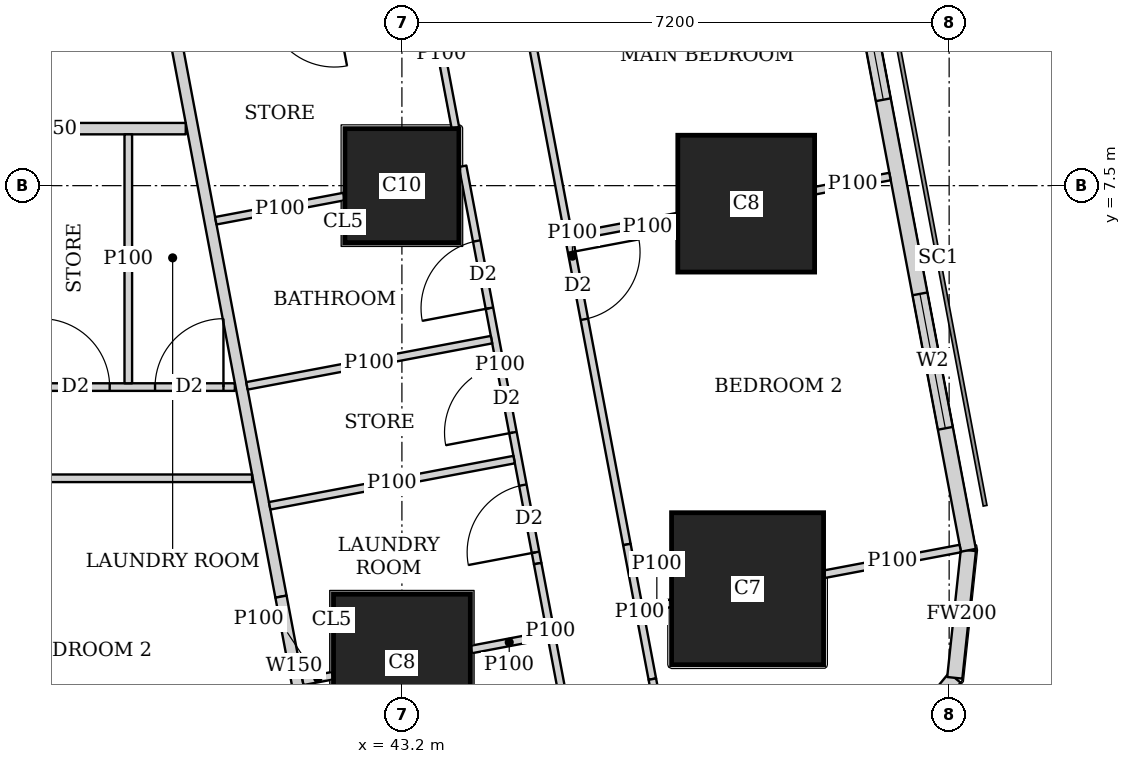
"""IFC4 building model, lengths in metres.
Left out: names, types, materials, properties, quantities, classifications, styles, units other than length and angle.
Written with IfcOpenShell. Run it as: python <this file> out.ifc"""

import sys

from ifc_helpers import new_model, si_unit, direction, frame, frame_2d, origin, origin_2d, place, context, subcontext, project, spatial, rectangle, extrude, element, fill, save


model = new_model("IFC4")
c1 = context("Model", 3, precision=1e-05, world=origin(), true_north=direction((0.0, 1.0)))
c2 = subcontext(c1, "Body", "Model", "MODEL_VIEW")
j1 = project(units=[si_unit("LENGTHUNIT", "METRE"), si_unit("PLANEANGLEUNIT", "RADIAN")], contexts=[c1])
p1 = place(None, origin())
s1 = spatial("IfcSite", under=j1, at=p1, CompositionType="ELEMENT")
p2 = place(p1, origin())
s2 = spatial("IfcBuilding", under=s1, at=p2, CompositionType="ELEMENT")
p3 = place(p2, frame((0.0, 0.0, 169.55)))
s3 = spatial("IfcBuildingStorey", under=s2, at=p3, CompositionType="ELEMENT", Elevation=169.55)
p4 = place(p3, frame((43.2, 1.225, 0.0), z_axis=(0.0, 0.0, 1.0), x_axis=(1.0, 0.0, 0.0)))
e1 = element("IfcColumn", 1, at=p4, inside=s3, PredefinedType="COLUMN", context=c2, shape_type="SweptSolid", body=[
    extrude(rectangle(XDim=1.8, YDim=1.8, at=origin_2d()), origin(), (0.0, 0.0, 1.0), 3.75),
])
p5 = place(p3, frame((47.748, 2.197, 0.0), z_axis=(0.0, 0.0, 1.0), x_axis=(1.0, 0.0, 0.0)))
e2 = element("IfcColumn", 2, at=p5, inside=s3, PredefinedType="COLUMN", context=c2, shape_type="SweptSolid", body=[
    extrude(rectangle(XDim=2.0, YDim=2.0, at=origin_2d()), origin(), (0.0, 0.0, 1.0), 3.75),
])
p6 = place(p3, frame((43.2, 7.5, 0.0), z_axis=(0.0, 0.0, 1.0), x_axis=(1.0, 0.0, 0.0)))
e3 = element("IfcColumn", 3, at=p6, inside=s3, PredefinedType="COLUMN", context=c2, shape_type="SweptSolid", body=[
    extrude(rectangle(XDim=1.5, YDim=1.5, at=origin_2d()), origin(), (0.0, 0.0, 1.0), 3.75),
])
p7 = place(p3, frame((47.73, 7.263, 0.0), z_axis=(0.0, 0.0, 1.0), x_axis=(1.0, 0.0, 0.0)))
e4 = element("IfcColumn", 4, at=p7, inside=s3, PredefinedType="COLUMN", context=c2, shape_type="SweptSolid", body=[
    extrude(rectangle(XDim=1.8, YDim=1.8, at=origin_2d()), origin(), (0.0, 0.0, 1.0), 3.75),
])
p8 = place(p3, frame((49.407, -0.263, 0.0), z_axis=(0.0, 0.0, 1.0), x_axis=(0.638042593423, 0.770001070764, 0.0)))
e5 = element("IfcWall", 5, at=p8, inside=s3, PredefinedType="SOLIDWALL", context=c2, shape_type="SweptSolid", body=[
    extrude(rectangle(XDim=1.673, YDim=0.2, at=frame_2d((0.836, 0.0))), origin(), (0.0, 0.0, 1.0), 3.5),
])
p9 = place(p3, frame((50.474, 1.025, 0.0), z_axis=(0.0, 0.0, 1.0), x_axis=(0.106047815515, 0.994361031429, 0.0)))
e6 = element("IfcWall", 6, at=p9, inside=s3, PredefinedType="SOLIDWALL", context=c2, shape_type="SweptSolid", body=[
    extrude(rectangle(XDim=1.688, YDim=0.2, at=frame_2d((0.844, 0.0))), origin(), (0.0, 0.0, 1.0), 3.5),
])
p10 = place(p3, frame((50.653, 2.703, 0.0), z_axis=(0.0, 0.0, 1.0), x_axis=(-0.185612026696, 0.982623109613, 0.0)))
e7 = element("IfcWall", 7, at=p10, inside=s3, PredefinedType="SOLIDWALL", context=c2, shape_type="SweptSolid", body=[
    extrude(rectangle(XDim=41.393, YDim=0.2, at=frame_2d((20.697, 0.0))), origin(), (0.0, 0.0, 1.0), 3.5),
])
p11 = place(p10, frame((1.633, 0.0, 0.9)))
e8 = element("IfcOpeningElement", 8, at=p11, cuts=e7, PredefinedType="OPENING", context=c2, shape_type="SweptSolid", body=[
    extrude(rectangle(XDim=1.8, YDim=1.5, at=frame_2d((0.9, 0.75))), frame((0.0, 0.11, 0.0), z_axis=(0.0, -1.0, 0.0), x_axis=(1.0, 0.0, 0.0)), (0.0, 0.0, 1.0), 0.22),
])
p12 = place(p10, frame((6.032, 0.0, 0.9)))
e9 = element("IfcOpeningElement", 9, at=p12, cuts=e7, PredefinedType="OPENING", context=c2, shape_type="SweptSolid", body=[
    extrude(rectangle(XDim=1.8, YDim=1.5, at=frame_2d((0.9, 0.75))), frame((0.0, 0.11, 0.0), z_axis=(0.0, -1.0, 0.0), x_axis=(1.0, 0.0, 0.0)), (0.0, 0.0, 1.0), 0.22),
])
p13 = place(p10, frame((9.848, 0.0, 0.9)))
e10 = element("IfcOpeningElement", 10, at=p13, cuts=e7, PredefinedType="OPENING", context=c2, shape_type="SweptSolid", body=[
    extrude(rectangle(XDim=1.8, YDim=1.5, at=frame_2d((0.9, 0.75))), frame((0.0, 0.11, 0.0), z_axis=(0.0, -1.0, 0.0), x_axis=(1.0, 0.0, 0.0)), (0.0, 0.0, 1.0), 0.22),
])
p14 = place(p10, frame((13.664, 0.0, 0.9)))
e11 = element("IfcOpeningElement", 11, at=p14, cuts=e7, PredefinedType="OPENING", context=c2, shape_type="SweptSolid", body=[
    extrude(rectangle(XDim=1.8, YDim=1.5, at=frame_2d((0.9, 0.75))), frame((0.0, 0.11, 0.0), z_axis=(0.0, -1.0, 0.0), x_axis=(1.0, 0.0, 0.0)), (0.0, 0.0, 1.0), 0.22),
])
p15 = place(p10, frame((17.481, 0.0, 0.9)))
e12 = element("IfcOpeningElement", 12, at=p15, cuts=e7, PredefinedType="OPENING", context=c2, shape_type="SweptSolid", body=[
    extrude(rectangle(XDim=1.8, YDim=1.5, at=frame_2d((0.9, 0.75))), frame((0.0, 0.11, 0.0), z_axis=(0.0, -1.0, 0.0), x_axis=(1.0, 0.0, 0.0)), (0.0, 0.0, 1.0), 0.22),
])
p16 = place(p10, frame((21.297, 0.0, 0.9)))
e13 = element("IfcOpeningElement", 13, at=p16, cuts=e7, PredefinedType="OPENING", context=c2, shape_type="SweptSolid", body=[
    extrude(rectangle(XDim=1.8, YDim=1.5, at=frame_2d((0.9, 0.75))), frame((0.0, 0.11, 0.0), z_axis=(0.0, -1.0, 0.0), x_axis=(1.0, 0.0, 0.0)), (0.0, 0.0, 1.0), 0.22),
])
p17 = place(p10, frame((25.113, 0.0, 0.9)))
e14 = element("IfcOpeningElement", 14, at=p17, cuts=e7, PredefinedType="OPENING", context=c2, shape_type="SweptSolid", body=[
    extrude(rectangle(XDim=1.8, YDim=1.5, at=frame_2d((0.9, 0.75))), frame((0.0, 0.11, 0.0), z_axis=(0.0, -1.0, 0.0), x_axis=(1.0, 0.0, 0.0)), (0.0, 0.0, 1.0), 0.22),
])
p18 = place(p10, frame((28.93, 0.0, 0.9)))
e15 = element("IfcOpeningElement", 15, at=p18, cuts=e7, PredefinedType="OPENING", context=c2, shape_type="SweptSolid", body=[
    extrude(rectangle(XDim=1.8, YDim=1.5, at=frame_2d((0.9, 0.75))), frame((0.0, 0.11, 0.0), z_axis=(0.0, -1.0, 0.0), x_axis=(1.0, 0.0, 0.0)), (0.0, 0.0, 1.0), 0.22),
])
p19 = place(p10, frame((32.746, 0.0, 0.9)))
e16 = element("IfcOpeningElement", 16, at=p19, cuts=e7, PredefinedType="OPENING", context=c2, shape_type="SweptSolid", body=[
    extrude(rectangle(XDim=1.8, YDim=1.5, at=frame_2d((0.9, 0.75))), frame((0.0, 0.11, 0.0), z_axis=(0.0, -1.0, 0.0), x_axis=(1.0, 0.0, 0.0)), (0.0, 0.0, 1.0), 0.22),
])
p20 = place(p10, frame((36.481, 0.0, 0.9)))
e17 = element("IfcOpeningElement", 17, at=p20, cuts=e7, PredefinedType="OPENING", context=c2, shape_type="SweptSolid", body=[
    extrude(rectangle(XDim=1.8, YDim=1.5, at=frame_2d((0.9, 0.75))), frame((0.0, 0.11, 0.0), z_axis=(0.0, -1.0, 0.0), x_axis=(1.0, 0.0, 0.0)), (0.0, 0.0, 1.0), 0.22),
])
p21 = place(p3, frame((40.356, 8.25, 0.0), z_axis=(0.0, 0.0, 1.0), x_axis=(-1.0, 0.0, 0.0)))
e18 = element("IfcWall", 18, at=p21, inside=s3, PredefinedType="SOLIDWALL", context=c2, shape_type="SweptSolid", body=[
    extrude(rectangle(XDim=3.605, YDim=0.15, at=frame_2d((1.802, 0.0))), origin(), (0.0, 0.0, 1.0), 3.5),
])
p22 = place(p3, frame((33.877, 43.029, 0.0), z_axis=(0.0, 0.0, 1.0), x_axis=(0.185596841028, -0.98262597798, 0.0)))
e19 = element("IfcWall", 19, at=p22, inside=s3, PredefinedType="SOLIDWALL", context=c2, shape_type="SweptSolid", body=[
    extrude(rectangle(XDim=41.66, YDim=0.15, at=frame_2d((20.83, 0.0))), origin(), (0.0, 0.0, 1.0), 2.5),
])
p23 = place(p22, frame((8.63, 0.0, 0.0)))
e20 = element("IfcOpeningElement", 20, at=p23, cuts=e19, PredefinedType="OPENING", context=c2, shape_type="SweptSolid", body=[
    extrude(rectangle(XDim=1.0, YDim=2.1, at=frame_2d((0.5, 1.05))), frame((0.0, 0.085, 0.0), z_axis=(0.0, -1.0, 0.0), x_axis=(1.0, 0.0, 0.0)), (0.0, 0.0, 1.0), 0.17),
])
p24 = place(p22, frame((13.841, 0.0, 0.0)))
e21 = element("IfcOpeningElement", 21, at=p24, cuts=e19, PredefinedType="OPENING", context=c2, shape_type="SweptSolid", body=[
    extrude(rectangle(XDim=1.0, YDim=2.1, at=frame_2d((0.5, 1.05))), frame((0.0, 0.085, 0.0), z_axis=(0.0, -1.0, 0.0), x_axis=(1.0, 0.0, 0.0)), (0.0, 0.0, 1.0), 0.17),
])
p25 = place(p22, frame((21.474, 0.0, 0.0)))
e22 = element("IfcOpeningElement", 22, at=p25, cuts=e19, PredefinedType="OPENING", context=c2, shape_type="SweptSolid", body=[
    extrude(rectangle(XDim=1.0, YDim=2.1, at=frame_2d((0.5, 1.05))), frame((0.0, 0.085, 0.0), z_axis=(0.0, -1.0, 0.0), x_axis=(1.0, 0.0, 0.0)), (0.0, 0.0, 1.0), 0.17),
])
p26 = place(p22, frame((30.4, 0.0, 0.0)))
e23 = element("IfcOpeningElement", 23, at=p26, cuts=e19, PredefinedType="OPENING", context=c2, shape_type="SweptSolid", body=[
    extrude(rectangle(XDim=1.0, YDim=2.1, at=frame_2d((0.5, 1.05))), frame((0.0, 0.085, 0.0), z_axis=(0.0, -1.0, 0.0), x_axis=(1.0, 0.0, 0.0)), (0.0, 0.0, 1.0), 0.17),
])
p27 = place(p22, frame((32.288, 0.0, 0.0)))
e24 = element("IfcOpeningElement", 24, at=p27, cuts=e19, PredefinedType="OPENING", context=c2, shape_type="SweptSolid", body=[
    extrude(rectangle(XDim=1.0, YDim=2.1, at=frame_2d((0.5, 1.05))), frame((0.0, 0.085, 0.0), z_axis=(0.0, -1.0, 0.0), x_axis=(1.0, 0.0, 0.0)), (0.0, 0.0, 1.0), 0.17),
])
p28 = place(p3, frame((41.609, 2.093, 0.0), z_axis=(0.0, 0.0, 1.0), x_axis=(0.185708872674, -0.982604811005, 0.0)))
e25 = element("IfcWall", 25, at=p28, inside=s3, PredefinedType="SOLIDWALL", context=c2, shape_type="SweptSolid", body=[
    extrude(rectangle(XDim=1.847, YDim=0.15, at=frame_2d((0.924, 0.0))), origin(), (0.0, 0.0, 1.0), 2.1),
])
p29 = place(p3, frame((41.229, 3.65, 0.0), z_axis=(0.0, 0.0, 1.0), x_axis=(-1.0, 0.0, 0.0)))
e26 = element("IfcWall", 26, at=p29, inside=s3, PredefinedType="PARTITIONING", context=c2, shape_type="SweptSolid", body=[
    extrude(rectangle(XDim=8.829, YDim=0.1, at=frame_2d((4.415, 0.0))), origin(), (0.0, 0.0, 1.0), 3.5),
])
p30 = place(p29, frame((6.53, 0.0, 0.0)))
e27 = element("IfcOpeningElement", 27, at=p30, cuts=e26, PredefinedType="OPENING", context=c2, shape_type="SweptSolid", body=[
    extrude(rectangle(XDim=0.9, YDim=2.1, at=frame_2d((0.45, 1.05))), frame((0.0, 0.06, 0.0), z_axis=(0.0, -1.0, 0.0), x_axis=(1.0, 0.0, 0.0)), (0.0, 0.0, 1.0), 0.12),
])
p31 = place(p29, frame((4.129, 0.0, 0.0)))
e28 = element("IfcOpeningElement", 28, at=p31, cuts=e26, PredefinedType="OPENING", context=c2, shape_type="SweptSolid", body=[
    extrude(rectangle(XDim=0.9, YDim=2.1, at=frame_2d((0.45, 1.05))), frame((0.0, 0.06, 0.0), z_axis=(0.0, -1.0, 0.0), x_axis=(1.0, 0.0, 0.0)), (0.0, 0.0, 1.0), 0.12),
])
p32 = place(p3, frame((41.002, 4.85, 0.0), z_axis=(0.0, 0.0, 1.0), x_axis=(-1.0, 0.0, 0.0)))
e29 = element("IfcWall", 29, at=p32, inside=s3, PredefinedType="PARTITIONING", context=c2, shape_type="SweptSolid", body=[
    extrude(rectangle(XDim=7.403, YDim=0.1, at=frame_2d((3.701, 0.0))), origin(), (0.0, 0.0, 1.0), 3.5),
])
p33 = place(p32, frame((5.753, 0.0, 0.0)))
e30 = element("IfcOpeningElement", 30, at=p33, cuts=e29, PredefinedType="OPENING", context=c2, shape_type="SweptSolid", body=[
    extrude(rectangle(XDim=0.9, YDim=2.1, at=frame_2d((0.45, 1.05))), frame((0.0, 0.06, 0.0), z_axis=(0.0, -1.0, 0.0), x_axis=(1.0, 0.0, 0.0)), (0.0, 0.0, 1.0), 0.12),
])
p34 = place(p32, frame((3.447, 0.0, 0.0)))
e31 = element("IfcOpeningElement", 31, at=p34, cuts=e29, PredefinedType="OPENING", context=c2, shape_type="SweptSolid", body=[
    extrude(rectangle(XDim=0.9, YDim=2.1, at=frame_2d((0.45, 1.05))), frame((0.0, 0.06, 0.0), z_axis=(0.0, -1.0, 0.0), x_axis=(1.0, 0.0, 0.0)), (0.0, 0.0, 1.0), 0.12),
])
p35 = place(p32, frame((0.15, 0.0, 0.0)))
e32 = element("IfcOpeningElement", 32, at=p35, cuts=e29, PredefinedType="OPENING", context=c2, shape_type="SweptSolid", body=[
    extrude(rectangle(XDim=0.9, YDim=2.1, at=frame_2d((0.45, 1.05))), frame((0.0, 0.06, 0.0), z_axis=(0.0, -1.0, 0.0), x_axis=(1.0, 0.0, 0.0)), (0.0, 0.0, 1.0), 0.12),
])
p36 = place(p32, frame((1.647, 0.0, 0.0)))
e33 = element("IfcOpeningElement", 33, at=p36, cuts=e29, PredefinedType="OPENING", context=c2, shape_type="SweptSolid", body=[
    extrude(rectangle(XDim=0.9, YDim=2.1, at=frame_2d((0.45, 1.05))), frame((0.0, 0.06, 0.0), z_axis=(0.0, -1.0, 0.0), x_axis=(1.0, 0.0, 0.0)), (0.0, 0.0, 1.0), 0.12),
])
p37 = place(p3, frame((39.6, 4.9, 0.0), z_axis=(0.0, 0.0, 1.0), x_axis=(0.0, 1.0, 0.0)))
e34 = element("IfcWall", 34, at=p37, inside=s3, PredefinedType="PARTITIONING", context=c2, shape_type="SweptSolid", body=[
    extrude(rectangle(XDim=3.275, YDim=0.1, at=frame_2d((1.638, 0.0))), origin(), (0.0, 0.0, 1.0), 3.5),
])
p38 = place(p3, frame((44.727, 10.366, 0.0), z_axis=(0.0, 0.0, 1.0), x_axis=(0.185578957652, -0.982629355595, 0.0)))
e35 = element("IfcWall", 35, at=p38, inside=s3, PredefinedType="PARTITIONING", context=c2, shape_type="SweptSolid", body=[
    extrude(rectangle(XDim=7.721, YDim=0.1, at=frame_2d((3.86, 0.0))), origin(), (0.0, 0.0, 1.0), 3.5),
])
p39 = place(p38, frame((0.151, 0.0, 0.0)))
e36 = element("IfcOpeningElement", 36, at=p39, cuts=e35, PredefinedType="OPENING", context=c2, shape_type="SweptSolid", body=[
    extrude(rectangle(XDim=0.9, YDim=2.1, at=frame_2d((0.45, 1.05))), frame((0.0, 0.06, 0.0), z_axis=(0.0, -1.0, 0.0), x_axis=(1.0, 0.0, 0.0)), (0.0, 0.0, 1.0), 0.12),
])
p40 = place(p38, frame((3.806, 0.0, 0.0)))
e37 = element("IfcOpeningElement", 37, at=p40, cuts=e35, PredefinedType="OPENING", context=c2, shape_type="SweptSolid", body=[
    extrude(rectangle(XDim=0.9, YDim=2.1, at=frame_2d((0.45, 1.05))), frame((0.0, 0.06, 0.0), z_axis=(0.0, -1.0, 0.0), x_axis=(1.0, 0.0, 0.0)), (0.0, 0.0, 1.0), 0.12),
])
p41 = place(p3, frame((46.16, 2.779, 0.0), z_axis=(0.0, 0.0, 1.0), x_axis=(0.18597295662, -0.982554863306, 0.0)))
e38 = element("IfcWall", 38, at=p41, inside=s3, PredefinedType="PARTITIONING", context=c2, shape_type="SweptSolid", body=[
    extrude(rectangle(XDim=1.802, YDim=0.1, at=frame_2d((0.901, 0.0))), origin(), (0.0, 0.0, 1.0), 2.1),
])
p42 = place(p3, frame((46.495, 1.008, 0.0), z_axis=(0.0, 0.0, 1.0), x_axis=(0.185535059532, -0.982637645159, 0.0)))
e39 = element("IfcWall", 39, at=p42, inside=s3, PredefinedType="PARTITIONING", context=c2, shape_type="SweptSolid", body=[
    extrude(rectangle(XDim=1.644, YDim=0.1, at=frame_2d((0.822, 0.0))), origin(), (0.0, 0.0, 1.0), 3.5),
])
p43 = place(p3, frame((43.539, 10.192, 0.0), z_axis=(0.0, 0.0, 1.0), x_axis=(0.18564540894, -0.982616803306, 0.0)))
e40 = element("IfcWall", 40, at=p43, inside=s3, PredefinedType="PARTITIONING", context=c2, shape_type="SweptSolid", body=[
    extrude(rectangle(XDim=1.966, YDim=0.1, at=frame_2d((0.983, 0.0))), origin(), (0.0, 0.0, 1.0), 3.5),
])
p44 = place(p3, frame((43.999, 7.755, 0.0), z_axis=(0.0, 0.0, 1.0), x_axis=(0.185565904578, -0.982631820703, 0.0)))
e41 = element("IfcWall", 41, at=p44, inside=s3, PredefinedType="PARTITIONING", context=c2, shape_type="SweptSolid", body=[
    extrude(rectangle(XDim=5.319, YDim=0.1, at=frame_2d((2.66, 0.0))), origin(), (0.0, 0.0, 1.0), 3.5),
])
p45 = place(p44, frame((1.0, 0.0, 0.0)))
e42 = element("IfcOpeningElement", 42, at=p45, cuts=e41, PredefinedType="OPENING", context=c2, shape_type="SweptSolid", body=[
    extrude(rectangle(XDim=0.9, YDim=2.1, at=frame_2d((0.45, 1.05))), frame((0.0, 0.06, 0.0), z_axis=(0.0, -1.0, 0.0), x_axis=(1.0, 0.0, 0.0)), (0.0, 0.0, 1.0), 0.12),
])
p46 = place(p44, frame((4.269, 0.0, 0.0)))
e43 = element("IfcOpeningElement", 43, at=p46, cuts=e41, PredefinedType="OPENING", context=c2, shape_type="SweptSolid", body=[
    extrude(rectangle(XDim=0.9, YDim=2.1, at=frame_2d((0.45, 1.05))), frame((0.0, 0.06, 0.0), z_axis=(0.0, -1.0, 0.0), x_axis=(1.0, 0.0, 0.0)), (0.0, 0.0, 1.0), 0.12),
])
p47 = place(p44, frame((2.665, 0.0, 0.0)))
e44 = element("IfcOpeningElement", 44, at=p47, cuts=e41, PredefinedType="OPENING", context=c2, shape_type="SweptSolid", body=[
    extrude(rectangle(XDim=0.9, YDim=2.1, at=frame_2d((0.45, 1.05))), frame((0.0, 0.06, 0.0), z_axis=(0.0, -1.0, 0.0), x_axis=(1.0, 0.0, 0.0)), (0.0, 0.0, 1.0), 0.12),
])
p48 = place(p3, frame((44.986, 2.528, 0.0), z_axis=(0.0, 0.0, 1.0), x_axis=(0.18584218627, -0.982579605835, 0.0)))
e45 = element("IfcWall", 45, at=p48, inside=s3, PredefinedType="PARTITIONING", context=c2, shape_type="SweptSolid", body=[
    extrude(rectangle(XDim=1.802, YDim=0.1, at=frame_2d((0.901, 0.0))), origin(), (0.0, 0.0, 1.0), 2.1),
])
p49 = place(p3, frame((49.622, 7.62, 0.0), z_axis=(0.0, 0.0, 1.0), x_axis=(-0.982708646087, -0.185158626332, 0.0)))
e46 = element("IfcWall", 46, at=p49, inside=s3, PredefinedType="PARTITIONING", context=c2, shape_type="SweptSolid", body=[
    extrude(rectangle(XDim=1.0, YDim=0.1, at=frame_2d((0.5, 0.0))), origin(), (0.0, 0.0, 1.0), 3.5),
])
p50 = place(p3, frame((46.82, 7.091, 0.0), z_axis=(0.0, 0.0, 1.0), x_axis=(-0.982689853246, -0.185258339427, 0.0)))
e47 = element("IfcWall", 47, at=p50, inside=s3, PredefinedType="PARTITIONING", context=c2, shape_type="SweptSolid", body=[
    extrude(rectangle(XDim=1.398, YDim=0.1, at=frame_2d((0.699, 0.0))), origin(), (0.0, 0.0, 1.0), 3.5),
])
p51 = place(p3, frame((50.547, 2.726, 0.0), z_axis=(0.0, 0.0, 1.0), x_axis=(-0.982603988143, -0.185713226471, 0.0)))
e48 = element("IfcWall", 48, at=p51, inside=s3, PredefinedType="PARTITIONING", context=c2, shape_type="SweptSolid", body=[
    extrude(rectangle(XDim=1.821, YDim=0.1, at=frame_2d((0.91, 0.0))), origin(), (0.0, 0.0, 1.0), 3.5),
])
p52 = place(p3, frame((46.738, 2.006, 0.0), z_axis=(0.0, 0.0, 1.0), x_axis=(-0.982820466874, -0.184564161994, 0.0)))
e49 = element("IfcWall", 49, at=p52, inside=s3, PredefinedType="PARTITIONING", context=c2, shape_type="SweptSolid", body=[
    extrude(rectangle(XDim=0.374, YDim=0.1, at=frame_2d((0.187, 0.0))), origin(), (0.0, 0.0, 1.0), 2.1),
])
p53 = place(p3, frame((42.44, 7.357, 0.0), z_axis=(0.0, 0.0, 1.0), x_axis=(-0.982643094077, -0.185506198448, 0.0)))
e50 = element("IfcWall", 50, at=p53, inside=s3, PredefinedType="PARTITIONING", context=c2, shape_type="SweptSolid", body=[
    extrude(rectangle(XDim=1.719, YDim=0.1, at=frame_2d((0.859, 0.0))), origin(), (0.0, 0.0, 1.0), 3.5),
])
p54 = place(p3, frame((45.114, 1.587, 0.0), z_axis=(0.0, 0.0, 1.0), x_axis=(-0.982567886437, -0.185904138047, 0.0)))
e51 = element("IfcWall", 51, at=p54, inside=s3, PredefinedType="PARTITIONING", context=c2, shape_type="SweptSolid", body=[
    extrude(rectangle(XDim=1.022, YDim=0.1, at=frame_2d((0.511, 0.0))), origin(), (0.0, 0.0, 1.0), 2.1),
])
p55 = place(p3, frame((42.29, 1.053, 0.0), z_axis=(0.0, 0.0, 1.0), x_axis=(-0.982830800147, -0.184509127909, 0.0)))
e52 = element("IfcWall", 52, at=p55, inside=s3, PredefinedType="PARTITIONING", context=c2, shape_type="SweptSolid", body=[
    extrude(rectangle(XDim=0.401, YDim=0.1, at=frame_2d((0.2, 0.0))), origin(), (0.0, 0.0, 1.0), 2.1),
])
p56 = place(p3, frame((44.677, 3.896, 0.0), z_axis=(0.0, 0.0, 1.0), x_axis=(-0.982610347627, -0.185679575441, 0.0)))
e53 = element("IfcWall", 53, at=p56, inside=s3, PredefinedType="PARTITIONING", context=c2, shape_type="SweptSolid", body=[
    extrude(rectangle(XDim=3.274, YDim=0.1, at=frame_2d((1.637, 0.0))), origin(), (0.0, 0.0, 1.0), 3.5),
])
p57 = place(p3, frame((44.379, 5.474, 0.0), z_axis=(0.0, 0.0, 1.0), x_axis=(-0.982607026909, -0.185697147715, 0.0)))
e54 = element("IfcWall", 54, at=p57, inside=s3, PredefinedType="PARTITIONING", context=c2, shape_type="SweptSolid", body=[
    extrude(rectangle(XDim=3.275, YDim=0.1, at=frame_2d((1.637, 0.0))), origin(), (0.0, 0.0, 1.0), 3.5),
])
p58 = place(p11, origin())
e55 = element("IfcWindow", 55, at=p58, inside=s3, PartitioningType="SINGLE_PANEL", PredefinedType="WINDOW", context=c2, shape_type="SweptSolid", body=[
    extrude(rectangle(XDim=1.8, YDim=1.5, at=frame_2d((0.9, 0.75))), frame((0.0, 0.03, 0.0), z_axis=(0.0, -1.0, 0.0), x_axis=(1.0, 0.0, 0.0)), (0.0, 0.0, 1.0), 0.06),
])
fill(e8, e55)
p59 = place(p12, origin())
e56 = element("IfcWindow", 56, at=p59, inside=s3, PartitioningType="SINGLE_PANEL", PredefinedType="WINDOW", context=c2, shape_type="SweptSolid", body=[
    extrude(rectangle(XDim=1.8, YDim=1.5, at=frame_2d((0.9, 0.75))), frame((0.0, 0.03, 0.0), z_axis=(0.0, -1.0, 0.0), x_axis=(1.0, 0.0, 0.0)), (0.0, 0.0, 1.0), 0.06),
])
fill(e9, e56)
p60 = place(p35, origin())
e57 = element("IfcDoor", 57, at=p60, inside=s3, OperationType="SINGLE_SWING_RIGHT", PredefinedType="DOOR", context=c2, shape_type="SweptSolid", body=[
    extrude(rectangle(XDim=0.9, YDim=2.1, at=frame_2d((0.45, 1.05))), frame((0.0, 0.025, 0.0), z_axis=(0.0, -1.0, 0.0), x_axis=(1.0, 0.0, 0.0)), (0.0, 0.0, 1.0), 0.05),
])
fill(e32, e57)
p61 = place(p36, origin())
e58 = element("IfcDoor", 58, at=p61, inside=s3, OperationType="SINGLE_SWING_LEFT", PredefinedType="DOOR", context=c2, shape_type="SweptSolid", body=[
    extrude(rectangle(XDim=0.9, YDim=2.1, at=frame_2d((0.45, 1.05))), frame((0.0, 0.025, 0.0), z_axis=(0.0, -1.0, 0.0), x_axis=(1.0, 0.0, 0.0)), (0.0, 0.0, 1.0), 0.05),
])
fill(e33, e58)
p62 = place(p40, origin())
e59 = element("IfcDoor", 59, at=p62, inside=s3, OperationType="SINGLE_SWING_LEFT", PredefinedType="DOOR", context=c2, shape_type="SweptSolid", body=[
    extrude(rectangle(XDim=0.9, YDim=2.1, at=frame_2d((0.45, 1.05))), frame((0.0, 0.025, 0.0), z_axis=(0.0, -1.0, 0.0), x_axis=(1.0, 0.0, 0.0)), (0.0, 0.0, 1.0), 0.05),
])
fill(e37, e59)
p63 = place(p45, origin())
e60 = element("IfcDoor", 60, at=p63, inside=s3, OperationType="SINGLE_SWING_LEFT", PredefinedType="DOOR", context=c2, shape_type="SweptSolid", body=[
    extrude(rectangle(XDim=0.9, YDim=2.1, at=frame_2d((0.45, 1.05))), frame((0.0, 0.025, 0.0), z_axis=(0.0, -1.0, 0.0), x_axis=(1.0, 0.0, 0.0)), (0.0, 0.0, 1.0), 0.05),
])
fill(e42, e60)
p64 = place(p46, origin())
e61 = element("IfcDoor", 61, at=p64, inside=s3, OperationType="SINGLE_SWING_LEFT", PredefinedType="DOOR", context=c2, shape_type="SweptSolid", body=[
    extrude(rectangle(XDim=0.9, YDim=2.1, at=frame_2d((0.45, 1.05))), frame((0.0, 0.025, 0.0), z_axis=(0.0, -1.0, 0.0), x_axis=(1.0, 0.0, 0.0)), (0.0, 0.0, 1.0), 0.05),
])
fill(e43, e61)
p65 = place(p47, origin())
e62 = element("IfcDoor", 62, at=p65, inside=s3, OperationType="SINGLE_SWING_LEFT", PredefinedType="DOOR", context=c2, shape_type="SweptSolid", body=[
    extrude(rectangle(XDim=0.9, YDim=2.1, at=frame_2d((0.45, 1.05))), frame((0.0, 0.025, 0.0), z_axis=(0.0, -1.0, 0.0), x_axis=(1.0, 0.0, 0.0)), (0.0, 0.0, 1.0), 0.05),
])
fill(e44, e62)
save(model, sys.argv[1])
